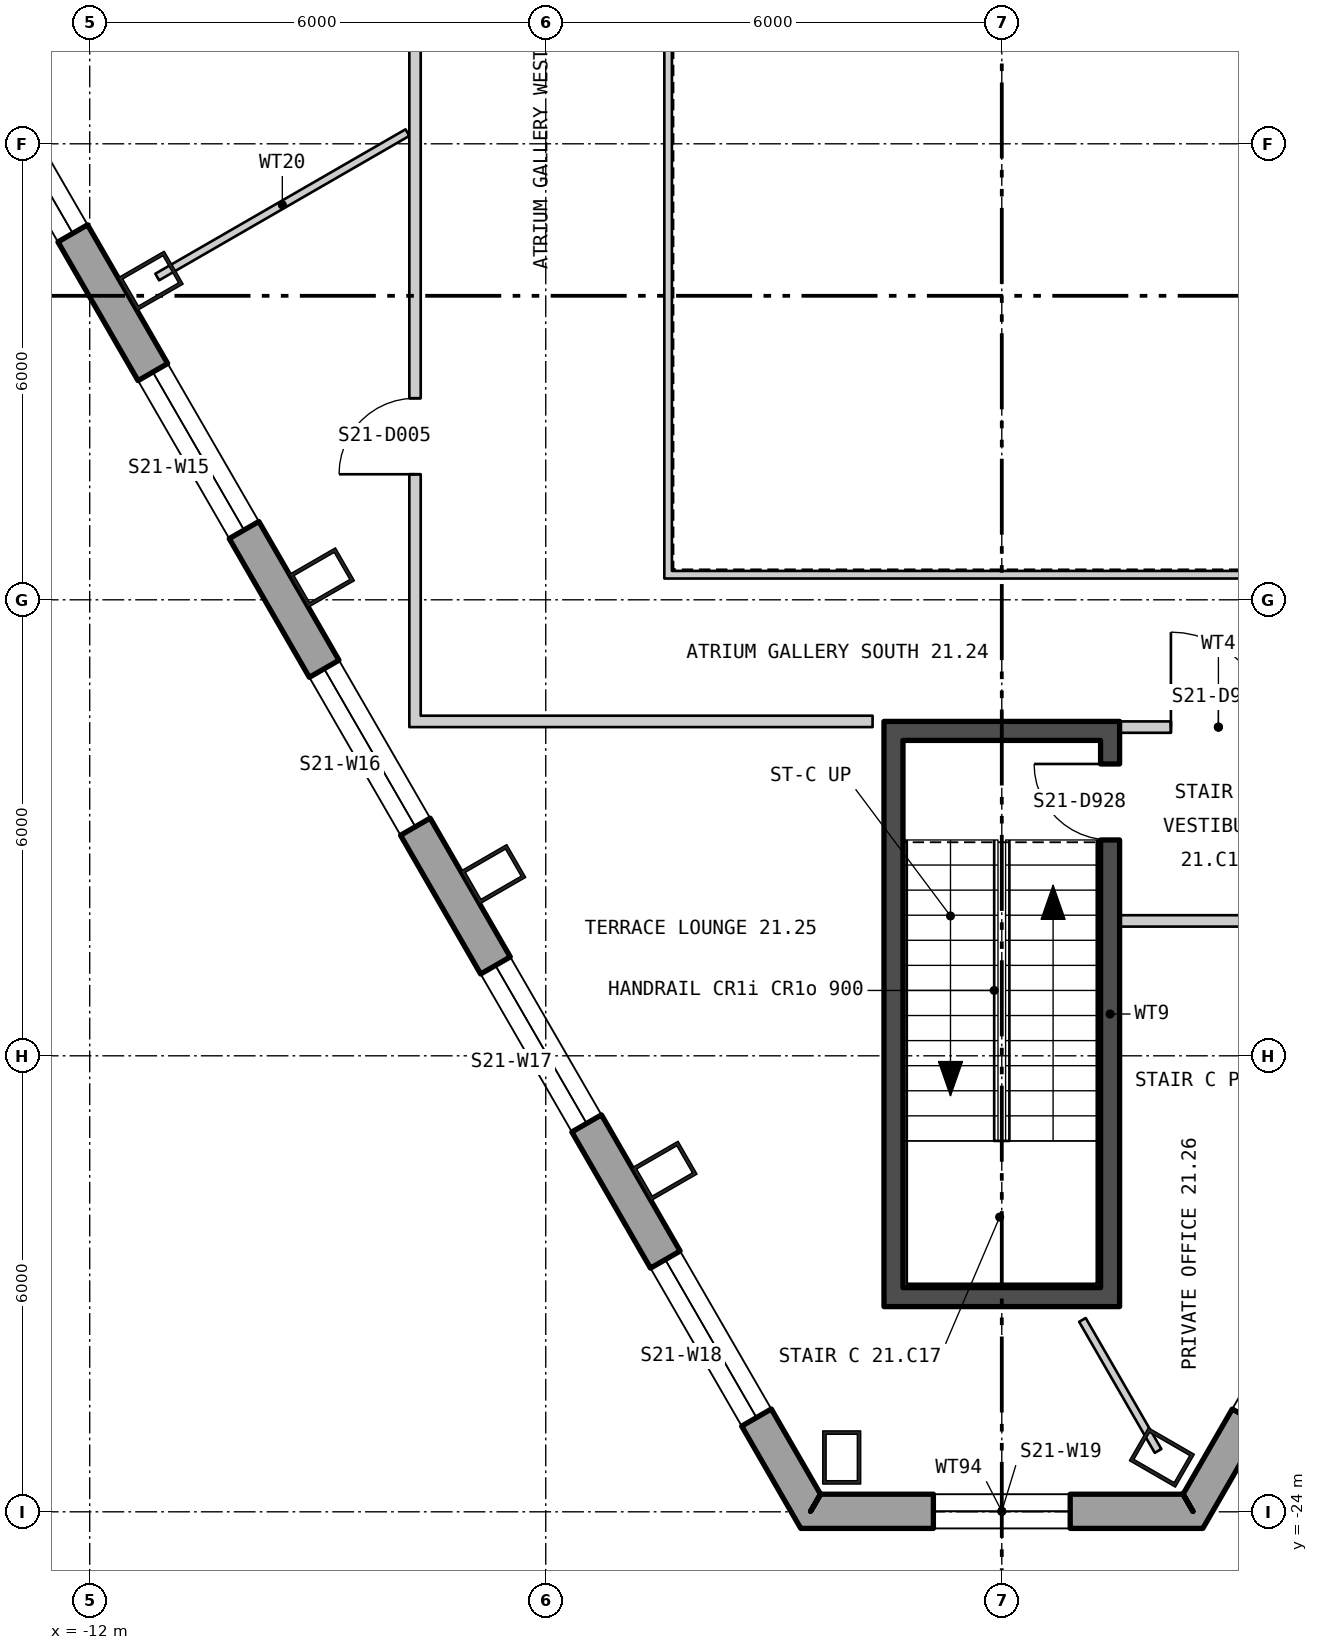
"""IFC4 building model, lengths in metres.
Left out: names, types, materials, properties, quantities, classifications, styles, units other than length and angle.
Written with IfcOpenShell. Run it as: python <this file> out.ifc"""

import sys

from ifc_helpers import new_model, si_unit, direction, frame, frame_2d, origin, origin_2d, place, context, subcontext, project, spatial, polyline, rectangle, hollow_rectangle, outline, extrude, element, fill, save


model = new_model("IFC4")
c1 = context("Model", 3, precision=1e-05, world=origin(), true_north=direction((0.0, 1.0)))
c2 = subcontext(c1, "Body", "Model", "MODEL_VIEW")
j1 = project(units=[si_unit("LENGTHUNIT", "METRE"), si_unit("PLANEANGLEUNIT", "RADIAN")], contexts=[c1])
p1 = place(None, origin())
s1 = spatial("IfcSite", under=j1, at=p1, CompositionType="ELEMENT")
p2 = place(p1, origin())
s2 = spatial("IfcBuilding", under=s1, at=p2, CompositionType="ELEMENT")
p3 = place(p2, frame((0.0, 0.0, 280.5)))
s3 = spatial("IfcBuildingStorey", under=s2, at=p3, CompositionType="ELEMENT", Elevation=280.5)
for number, where, z_axis, x_axis in (
    (1, (-11.198, -7.804, 0.0), (0.0, 0.0, 1.0), (0.5, -0.866, 0.0)),
    (2, (-8.945, -11.707, 0.0), (0.0, 0.0, 1.0), (0.5, -0.866, 0.0)),
    (3, (-6.691, -15.611, 0.0), (0.0, 0.0, 1.0), (0.5, -0.866, 0.0)),
    (4, (-4.437, -19.515, 0.0), (0.0, 0.0, 1.0), (0.5, -0.866, 0.0)),
    (5, (-2.106, -23.285, 0.0), (0.0, 0.0, 1.0), (1.0, 0.0, 0.0)),
    (6, (2.106, -23.285, 0.0), (0.0, 0.0, 1.0), (0.5, 0.866, 0.0)),
):
    element("IfcColumn", number, at=place(p3, frame(where, z_axis=z_axis, x_axis=x_axis)), inside=s3, PredefinedType="COLUMN", context=c2, shape_type="SweptSolid", body=[
        extrude(hollow_rectangle(XDim=0.5, YDim=0.7, WallThickness=0.045, at=origin_2d()), origin(), (0.0, 0.0, 1.0), 3.9),
    ])
p4 = place(p3, frame((-25.385, 15.619, -0.18), z_axis=(0.0, 0.0, 1.0), x_axis=(0.500000711659, -0.866024992908, 0.0)))
e7 = element("IfcWall", 7, at=p4, inside=s3, PredefinedType="SOLIDWALL", context=c2, shape_type="SweptSolid", body=[
    extrude(outline(polyline([(-0.13, -0.225), (45.87, -0.225), (45.61, 0.225), (0.13, 0.225), (-0.13, -0.225)])), origin(), (0.0, 0.0, 1.0), 3.68),
])
p5 = place(p4, frame((1.424, 0.0, 1.08)))
e8 = element("IfcOpeningElement", 8, at=p5, cuts=e7, PredefinedType="OPENING", context=c2, shape_type="SweptSolid", body=[
    extrude(rectangle(XDim=2.4, YDim=2.0, at=frame_2d((1.2, 1.0))), frame((0.0, 0.235, 0.0), z_axis=(0.0, -1.0, 0.0), x_axis=(1.0, 0.0, 0.0)), (0.0, 0.0, 1.0), 0.47),
])
p6 = place(p4, frame((5.893, 0.0, 1.08)))
e9 = element("IfcOpeningElement", 9, at=p6, cuts=e7, PredefinedType="OPENING", context=c2, shape_type="SweptSolid", body=[
    extrude(rectangle(XDim=2.4, YDim=2.0, at=frame_2d((1.2, 1.0))), frame((0.0, 0.235, 0.0), z_axis=(0.0, -1.0, 0.0), x_axis=(1.0, 0.0, 0.0)), (0.0, 0.0, 1.0), 0.47),
])
p7 = place(p4, frame((10.401, 0.0, 1.08)))
e10 = element("IfcOpeningElement", 10, at=p7, cuts=e7, PredefinedType="OPENING", context=c2, shape_type="SweptSolid", body=[
    extrude(rectangle(XDim=2.4, YDim=2.0, at=frame_2d((1.2, 1.0))), frame((0.0, 0.235, 0.0), z_axis=(0.0, -1.0, 0.0), x_axis=(1.0, 0.0, 0.0)), (0.0, 0.0, 1.0), 0.47),
])
p8 = place(p4, frame((14.909, 0.0, 1.08)))
e11 = element("IfcOpeningElement", 11, at=p8, cuts=e7, PredefinedType="OPENING", context=c2, shape_type="SweptSolid", body=[
    extrude(rectangle(XDim=2.4, YDim=2.0, at=frame_2d((1.2, 1.0))), frame((0.0, 0.235, 0.0), z_axis=(0.0, -1.0, 0.0), x_axis=(1.0, 0.0, 0.0)), (0.0, 0.0, 1.0), 0.47),
])
p9 = place(p4, frame((19.416, 0.0, 1.08)))
e12 = element("IfcOpeningElement", 12, at=p9, cuts=e7, PredefinedType="OPENING", context=c2, shape_type="SweptSolid", body=[
    extrude(rectangle(XDim=2.4, YDim=2.0, at=frame_2d((1.2, 1.0))), frame((0.0, 0.235, 0.0), z_axis=(0.0, -1.0, 0.0), x_axis=(1.0, 0.0, 0.0)), (0.0, 0.0, 1.0), 0.47),
])
p10 = place(p4, frame((23.924, 0.0, 1.08)))
e13 = element("IfcOpeningElement", 13, at=p10, cuts=e7, PredefinedType="OPENING", context=c2, shape_type="SweptSolid", body=[
    extrude(rectangle(XDim=2.4, YDim=2.0, at=frame_2d((1.2, 1.0))), frame((0.0, 0.235, 0.0), z_axis=(0.0, -1.0, 0.0), x_axis=(1.0, 0.0, 0.0)), (0.0, 0.0, 1.0), 0.47),
])
p11 = place(p4, frame((28.431, 0.0, 1.08)))
e14 = element("IfcOpeningElement", 14, at=p11, cuts=e7, PredefinedType="OPENING", context=c2, shape_type="SweptSolid", body=[
    extrude(rectangle(XDim=2.4, YDim=2.0, at=frame_2d((1.2, 1.0))), frame((0.0, 0.235, 0.0), z_axis=(0.0, -1.0, 0.0), x_axis=(1.0, 0.0, 0.0)), (0.0, 0.0, 1.0), 0.47),
])
p12 = place(p4, frame((32.939, 0.0, 1.08)))
e15 = element("IfcOpeningElement", 15, at=p12, cuts=e7, PredefinedType="OPENING", context=c2, shape_type="SweptSolid", body=[
    extrude(rectangle(XDim=2.4, YDim=2.0, at=frame_2d((1.2, 1.0))), frame((0.0, 0.235, 0.0), z_axis=(0.0, -1.0, 0.0), x_axis=(1.0, 0.0, 0.0)), (0.0, 0.0, 1.0), 0.47),
])
p13 = place(p4, frame((37.447, 0.0, 1.08)))
e16 = element("IfcOpeningElement", 16, at=p13, cuts=e7, PredefinedType="OPENING", context=c2, shape_type="SweptSolid", body=[
    extrude(rectangle(XDim=2.4, YDim=2.0, at=frame_2d((1.2, 1.0))), frame((0.0, 0.235, 0.0), z_axis=(0.0, -1.0, 0.0), x_axis=(1.0, 0.0, 0.0)), (0.0, 0.0, 1.0), 0.47),
])
p14 = place(p4, frame((41.916, 0.0, 1.08)))
e17 = element("IfcOpeningElement", 17, at=p14, cuts=e7, PredefinedType="OPENING", context=c2, shape_type="SweptSolid", body=[
    extrude(rectangle(XDim=2.4, YDim=2.0, at=frame_2d((1.2, 1.0))), frame((0.0, 0.235, 0.0), z_axis=(0.0, -1.0, 0.0), x_axis=(1.0, 0.0, 0.0)), (0.0, 0.0, 1.0), 0.47),
])
p15 = place(p3, frame((-2.515, -23.993, -0.18), z_axis=(0.0, 0.0, 1.0), x_axis=(1.0, 0.0, 0.0)))
e18 = element("IfcWall", 18, at=p15, inside=s3, PredefinedType="SOLIDWALL", context=c2, shape_type="SweptSolid", body=[
    extrude(outline(polyline([(-0.13, -0.225), (5.16, -0.225), (4.9, 0.225), (0.13, 0.225), (-0.13, -0.225)])), origin(), (0.0, 0.0, 1.0), 3.68),
])
p16 = place(p15, frame((1.615, 0.0, 1.08)))
e19 = element("IfcOpeningElement", 19, at=p16, cuts=e18, PredefinedType="OPENING", context=c2, shape_type="SweptSolid", body=[
    extrude(rectangle(XDim=1.8, YDim=2.0, at=frame_2d((0.9, 1.0))), frame((0.0, 0.235, 0.0), z_axis=(0.0, -1.0, 0.0), x_axis=(1.0, 0.0, 0.0)), (0.0, 0.0, 1.0), 0.47),
])
p17 = place(p3, frame((2.515, -23.993, -0.18), z_axis=(0.0, 0.0, 1.0), x_axis=(0.500000711659, 0.866024992908, 0.0)))
e20 = element("IfcWall", 20, at=p17, inside=s3, PredefinedType="SOLIDWALL", context=c2, shape_type="SweptSolid", body=[
    extrude(outline(polyline([(-0.13, -0.225), (45.87, -0.225), (45.61, 0.225), (0.13, 0.225), (-0.13, -0.225)])), origin(), (0.0, 0.0, 1.0), 3.68),
])
p18 = place(p17, frame((1.424, 0.0, 1.08)))
e21 = element("IfcOpeningElement", 21, at=p18, cuts=e20, PredefinedType="OPENING", context=c2, shape_type="SweptSolid", body=[
    extrude(rectangle(XDim=2.4, YDim=2.0, at=frame_2d((1.2, 1.0))), frame((0.0, 0.235, 0.0), z_axis=(0.0, -1.0, 0.0), x_axis=(1.0, 0.0, 0.0)), (0.0, 0.0, 1.0), 0.47),
])
p19 = place(p17, frame((5.893, 0.0, 1.08)))
e22 = element("IfcOpeningElement", 22, at=p19, cuts=e20, PredefinedType="OPENING", context=c2, shape_type="SweptSolid", body=[
    extrude(rectangle(XDim=2.4, YDim=2.0, at=frame_2d((1.2, 1.0))), frame((0.0, 0.235, 0.0), z_axis=(0.0, -1.0, 0.0), x_axis=(1.0, 0.0, 0.0)), (0.0, 0.0, 1.0), 0.47),
])
p20 = place(p17, frame((10.401, 0.0, 1.08)))
e23 = element("IfcOpeningElement", 23, at=p20, cuts=e20, PredefinedType="OPENING", context=c2, shape_type="SweptSolid", body=[
    extrude(rectangle(XDim=2.4, YDim=2.0, at=frame_2d((1.2, 1.0))), frame((0.0, 0.235, 0.0), z_axis=(0.0, -1.0, 0.0), x_axis=(1.0, 0.0, 0.0)), (0.0, 0.0, 1.0), 0.47),
])
p21 = place(p17, frame((14.909, 0.0, 1.08)))
e24 = element("IfcOpeningElement", 24, at=p21, cuts=e20, PredefinedType="OPENING", context=c2, shape_type="SweptSolid", body=[
    extrude(rectangle(XDim=2.4, YDim=2.0, at=frame_2d((1.2, 1.0))), frame((0.0, 0.235, 0.0), z_axis=(0.0, -1.0, 0.0), x_axis=(1.0, 0.0, 0.0)), (0.0, 0.0, 1.0), 0.47),
])
p22 = place(p17, frame((19.416, 0.0, 1.08)))
e25 = element("IfcOpeningElement", 25, at=p22, cuts=e20, PredefinedType="OPENING", context=c2, shape_type="SweptSolid", body=[
    extrude(rectangle(XDim=2.4, YDim=2.0, at=frame_2d((1.2, 1.0))), frame((0.0, 0.235, 0.0), z_axis=(0.0, -1.0, 0.0), x_axis=(1.0, 0.0, 0.0)), (0.0, 0.0, 1.0), 0.47),
])
p23 = place(p17, frame((28.431, 0.0, 1.08)))
e26 = element("IfcOpeningElement", 26, at=p23, cuts=e20, PredefinedType="OPENING", context=c2, shape_type="SweptSolid", body=[
    extrude(rectangle(XDim=2.4, YDim=2.0, at=frame_2d((1.2, 1.0))), frame((0.0, 0.235, 0.0), z_axis=(0.0, -1.0, 0.0), x_axis=(1.0, 0.0, 0.0)), (0.0, 0.0, 1.0), 0.47),
])
p24 = place(p17, frame((37.447, 0.0, 1.08)))
e27 = element("IfcOpeningElement", 27, at=p24, cuts=e20, PredefinedType="OPENING", context=c2, shape_type="SweptSolid", body=[
    extrude(rectangle(XDim=2.4, YDim=2.0, at=frame_2d((1.2, 1.0))), frame((0.0, 0.235, 0.0), z_axis=(0.0, -1.0, 0.0), x_axis=(1.0, 0.0, 0.0)), (0.0, 0.0, 1.0), 0.47),
])
p25 = place(p17, frame((41.916, 0.0, 1.08)))
e28 = element("IfcOpeningElement", 28, at=p25, cuts=e20, PredefinedType="OPENING", context=c2, shape_type="SweptSolid", body=[
    extrude(rectangle(XDim=2.4, YDim=2.0, at=frame_2d((1.2, 1.0))), frame((0.0, 0.235, 0.0), z_axis=(0.0, -1.0, 0.0), x_axis=(1.0, 0.0, 0.0)), (0.0, 0.0, 1.0), 0.47),
])
p26 = place(p3, frame((-4.44, -11.67, 0.0), z_axis=(0.0, 0.0, 1.0), x_axis=(1.0, 0.0, 0.0)))
e29 = element("IfcWall", 29, at=p26, inside=s3, PredefinedType="PARTITIONING", context=c2, shape_type="SweptSolid", body=[
    extrude(rectangle(XDim=8.88, YDim=0.1, at=frame_2d((4.44, 0.0))), origin(), (0.0, 0.0, 1.0), 3.7),
])
p27 = place(p3, frame((-4.39, -3.58, 0.0), z_axis=(0.0, 0.0, 1.0), x_axis=(0.0, -1.0, 0.0)))
e30 = element("IfcWall", 30, at=p27, inside=s3, PredefinedType="PARTITIONING", context=c2, shape_type="SweptSolid", body=[
    extrude(rectangle(XDim=8.04, YDim=0.1, at=frame_2d((4.02, 0.0))), origin(), (0.0, 0.0, 1.0), 3.7),
])
p28 = place(p3, frame((-1.425, -21.05, 0.0), z_axis=(0.0, 0.0, 1.0), x_axis=(0.0, 1.0, 0.0)))
e31 = element("IfcWall", 31, at=p28, inside=s3, PredefinedType="SHEAR", context=c2, shape_type="SweptSolid", body=[
    extrude(rectangle(XDim=7.2, YDim=0.25, at=frame_2d((3.6, 0.0))), origin(), (0.0, 0.0, 1.0), 3.7),
])
p29 = place(p3, frame((1.425, -21.05, 0.0), z_axis=(0.0, 0.0, 1.0), x_axis=(0.0, 1.0, 0.0)))
e32 = element("IfcWall", 32, at=p29, inside=s3, PredefinedType="SHEAR", context=c2, shape_type="SweptSolid", body=[
    extrude(rectangle(XDim=7.2, YDim=0.25, at=frame_2d((3.6, 0.0))), origin(), (0.0, 0.0, 1.0), 3.7),
])
p30 = place(p29, frame((5.89, 0.0, 0.0)))
e33 = element("IfcOpeningElement", 33, at=p30, cuts=e32, PredefinedType="OPENING", context=c2, shape_type="SweptSolid", body=[
    extrude(rectangle(XDim=1.0, YDim=2.1, at=frame_2d((0.5, 1.05))), frame((0.0, 0.135, 0.0), z_axis=(0.0, -1.0, 0.0), x_axis=(1.0, 0.0, 0.0)), (0.0, 0.0, 1.0), 0.27),
])
for number, where, z_axis, x_axis in (
    (34, (-1.55, -21.175, 0.0), (0.0, 0.0, 1.0), (1.0, 0.0, 0.0)),
    (35, (-1.55, -13.725, 0.0), (0.0, 0.0, 1.0), (1.0, 0.0, 0.0)),
):
    element("IfcWall", number, at=place(p3, frame(where, z_axis=z_axis, x_axis=x_axis)), inside=s3, PredefinedType="SHEAR", context=c2, shape_type="SweptSolid", body=[
        extrude(rectangle(XDim=3.1, YDim=0.25, at=frame_2d((1.55, 0.0))), origin(), (0.0, 0.0, 1.0), 3.7),
    ])
p31 = place(p3, frame((1.55, -16.225, 0.0), z_axis=(0.0, 0.0, 1.0), x_axis=(1.0, 0.0, 0.0)))
e36 = element("IfcWall", 36, at=p31, inside=s3, PredefinedType="PARTITIONING", context=c2, shape_type="SweptSolid", body=[
    extrude(rectangle(XDim=2.6, YDim=0.15, at=frame_2d((1.3, 0.0))), origin(), (0.0, 0.0, 1.0), 3.7),
])
p32 = place(p3, frame((1.55, -13.675, 0.0), z_axis=(0.0, 0.0, 1.0), x_axis=(1.0, 0.0, 0.0)))
e37 = element("IfcWall", 37, at=p32, inside=s3, PredefinedType="PARTITIONING", context=c2, shape_type="SweptSolid", body=[
    extrude(rectangle(XDim=2.6, YDim=0.15, at=frame_2d((1.3, 0.0))), origin(), (0.0, 0.0, 1.0), 2.79),
])
p33 = place(p32, frame((0.675, 0.0, 0.0)))
e38 = element("IfcOpeningElement", 38, at=p33, cuts=e37, PredefinedType="OPENING", context=c2, shape_type="SweptSolid", body=[
    extrude(rectangle(XDim=1.25, YDim=2.1, at=frame_2d((0.625, 1.05))), frame((0.0, 0.085, 0.0), z_axis=(0.0, -1.0, 0.0), x_axis=(1.0, 0.0, 0.0)), (0.0, 0.0, 1.0), 0.17),
])
p34 = place(p3, frame((-11.112, -7.753, 0.0), z_axis=(0.0, 0.0, 1.0), x_axis=(0.86609797283, 0.499874285655, 0.0)))
e39 = element("IfcWall", 39, at=p34, inside=s3, PredefinedType="PARTITIONING", context=c2, shape_type="SweptSolid", body=[
    extrude(rectangle(XDim=3.801, YDim=0.1, at=frame_2d((1.901, 0.0))), origin(), (0.0, 0.0, 1.0), 3.7),
])
p35 = place(p3, frame((-7.72, -13.675, 0.0), z_axis=(0.0, 0.0, 1.0), x_axis=(0.0, 1.0, 0.0)))
e40 = element("IfcWall", 40, at=p35, inside=s3, PredefinedType="PARTITIONING", context=c2, shape_type="SweptSolid", body=[
    extrude(rectangle(XDim=13.085, YDim=0.15, at=frame_2d((6.543, 0.0))), origin(), (0.0, 0.0, 1.0), 3.7),
])
p36 = place(p35, frame((3.327, 0.0, 0.0)))
e41 = element("IfcOpeningElement", 41, at=p36, cuts=e40, PredefinedType="OPENING", context=c2, shape_type="SweptSolid", body=[
    extrude(rectangle(XDim=1.0, YDim=2.1, at=frame_2d((0.5, 1.05))), frame((0.0, 0.085, 0.0), z_axis=(0.0, -1.0, 0.0), x_axis=(1.0, 0.0, 0.0)), (0.0, 0.0, 1.0), 0.17),
])
p37 = place(p35, frame((11.284, 0.0, 0.0)))
e42 = element("IfcOpeningElement", 42, at=p37, cuts=e40, PredefinedType="OPENING", context=c2, shape_type="SweptSolid", body=[
    extrude(rectangle(XDim=1.0, YDim=2.1, at=frame_2d((0.5, 1.05))), frame((0.0, 0.085, 0.0), z_axis=(0.0, -1.0, 0.0), x_axis=(1.0, 0.0, 0.0)), (0.0, 0.0, 1.0), 0.17),
])
p38 = place(p3, frame((-7.645, -13.6, 0.0), z_axis=(0.0, 0.0, 1.0), x_axis=(1.0, 0.0, 0.0)))
e43 = element("IfcWall", 43, at=p38, inside=s3, PredefinedType="PARTITIONING", context=c2, shape_type="SweptSolid", body=[
    extrude(rectangle(XDim=5.945, YDim=0.15, at=frame_2d((2.973, 0.0))), origin(), (0.0, 0.0, 1.0), 2.79),
])
p39 = place(p3, frame((1.061, -21.475, 0.0), z_axis=(0.0, 0.0, 1.0), x_axis=(0.499867417214, -0.866101936961, 0.0)))
e44 = element("IfcWall", 44, at=p39, inside=s3, PredefinedType="PARTITIONING", context=c2, shape_type="SweptSolid", body=[
    extrude(rectangle(XDim=1.99, YDim=0.1, at=frame_2d((0.995, 0.0))), origin(), (0.0, 0.0, 1.0), 3.7),
])
p40 = place(p10, origin())
e45 = element("IfcWindow", 45, at=p40, inside=s3, PartitioningType="SINGLE_PANEL", PredefinedType="WINDOW", context=c2, shape_type="SweptSolid", body=[
    extrude(rectangle(XDim=2.4, YDim=2.0, at=frame_2d((1.2, 1.0))), frame((0.0, 0.105, 0.0), z_axis=(0.0, -1.0, 0.0), x_axis=(1.0, 0.0, 0.0)), (0.0, 0.0, 1.0), 0.06),
])
fill(e13, e45)
p41 = place(p11, origin())
e46 = element("IfcWindow", 46, at=p41, inside=s3, PartitioningType="SINGLE_PANEL", PredefinedType="WINDOW", context=c2, shape_type="SweptSolid", body=[
    extrude(rectangle(XDim=2.4, YDim=2.0, at=frame_2d((1.2, 1.0))), frame((0.0, 0.105, 0.0), z_axis=(0.0, -1.0, 0.0), x_axis=(1.0, 0.0, 0.0)), (0.0, 0.0, 1.0), 0.06),
])
fill(e14, e46)
p42 = place(p12, origin())
e47 = element("IfcWindow", 47, at=p42, inside=s3, PartitioningType="SINGLE_PANEL", PredefinedType="WINDOW", context=c2, shape_type="SweptSolid", body=[
    extrude(rectangle(XDim=2.4, YDim=2.0, at=frame_2d((1.2, 1.0))), frame((0.0, 0.105, 0.0), z_axis=(0.0, -1.0, 0.0), x_axis=(1.0, 0.0, 0.0)), (0.0, 0.0, 1.0), 0.06),
])
fill(e15, e47)
p43 = place(p13, origin())
e48 = element("IfcWindow", 48, at=p43, inside=s3, PartitioningType="SINGLE_PANEL", PredefinedType="WINDOW", context=c2, shape_type="SweptSolid", body=[
    extrude(rectangle(XDim=2.4, YDim=2.0, at=frame_2d((1.2, 1.0))), frame((0.0, 0.105, 0.0), z_axis=(0.0, -1.0, 0.0), x_axis=(1.0, 0.0, 0.0)), (0.0, 0.0, 1.0), 0.06),
])
fill(e16, e48)
p44 = place(p14, origin())
e49 = element("IfcWindow", 49, at=p44, inside=s3, PartitioningType="SINGLE_PANEL", PredefinedType="WINDOW", context=c2, shape_type="SweptSolid", body=[
    extrude(rectangle(XDim=2.4, YDim=2.0, at=frame_2d((1.2, 1.0))), frame((0.0, 0.105, 0.0), z_axis=(0.0, -1.0, 0.0), x_axis=(1.0, 0.0, 0.0)), (0.0, 0.0, 1.0), 0.06),
])
fill(e17, e49)
p45 = place(p16, origin())
e50 = element("IfcWindow", 50, at=p45, inside=s3, PartitioningType="SINGLE_PANEL", PredefinedType="WINDOW", context=c2, shape_type="SweptSolid", body=[
    extrude(rectangle(XDim=1.8, YDim=2.0, at=frame_2d((0.9, 1.0))), frame((0.0, 0.105, 0.0), z_axis=(0.0, -1.0, 0.0), x_axis=(1.0, 0.0, 0.0)), (0.0, 0.0, 1.0), 0.06),
])
fill(e19, e50)
p46 = place(p30, origin())
e51 = element("IfcDoor", 51, at=p46, inside=s3, OperationType="SINGLE_SWING_LEFT", PredefinedType="DOOR", context=c2, shape_type="SweptSolid", body=[
    extrude(rectangle(XDim=1.0, YDim=2.1, at=frame_2d((0.5, 1.05))), frame((0.0, 0.025, 0.0), z_axis=(0.0, -1.0, 0.0), x_axis=(1.0, 0.0, 0.0)), (0.0, 0.0, 1.0), 0.05),
])
fill(e33, e51)
p47 = place(p33, origin())
e52 = element("IfcDoor", 52, at=p47, inside=s3, OperationType="SINGLE_SWING_RIGHT", PredefinedType="DOOR", context=c2, shape_type="SweptSolid", body=[
    extrude(rectangle(XDim=1.25, YDim=2.1, at=frame_2d((0.625, 1.05))), frame((0.0, 0.025, 0.0), z_axis=(0.0, -1.0, 0.0), x_axis=(1.0, 0.0, 0.0)), (0.0, 0.0, 1.0), 0.05),
])
fill(e38, e52)
p48 = place(p36, origin())
e53 = element("IfcDoor", 53, at=p48, inside=s3, OperationType="SINGLE_SWING_RIGHT", PredefinedType="DOOR", context=c2, shape_type="SweptSolid", body=[
    extrude(rectangle(XDim=1.0, YDim=2.1, at=frame_2d((0.5, 1.05))), frame((0.0, 0.025, 0.0), z_axis=(0.0, -1.0, 0.0), x_axis=(1.0, 0.0, 0.0)), (0.0, 0.0, 1.0), 0.05),
])
fill(e41, e53)
save(model, sys.argv[1])
